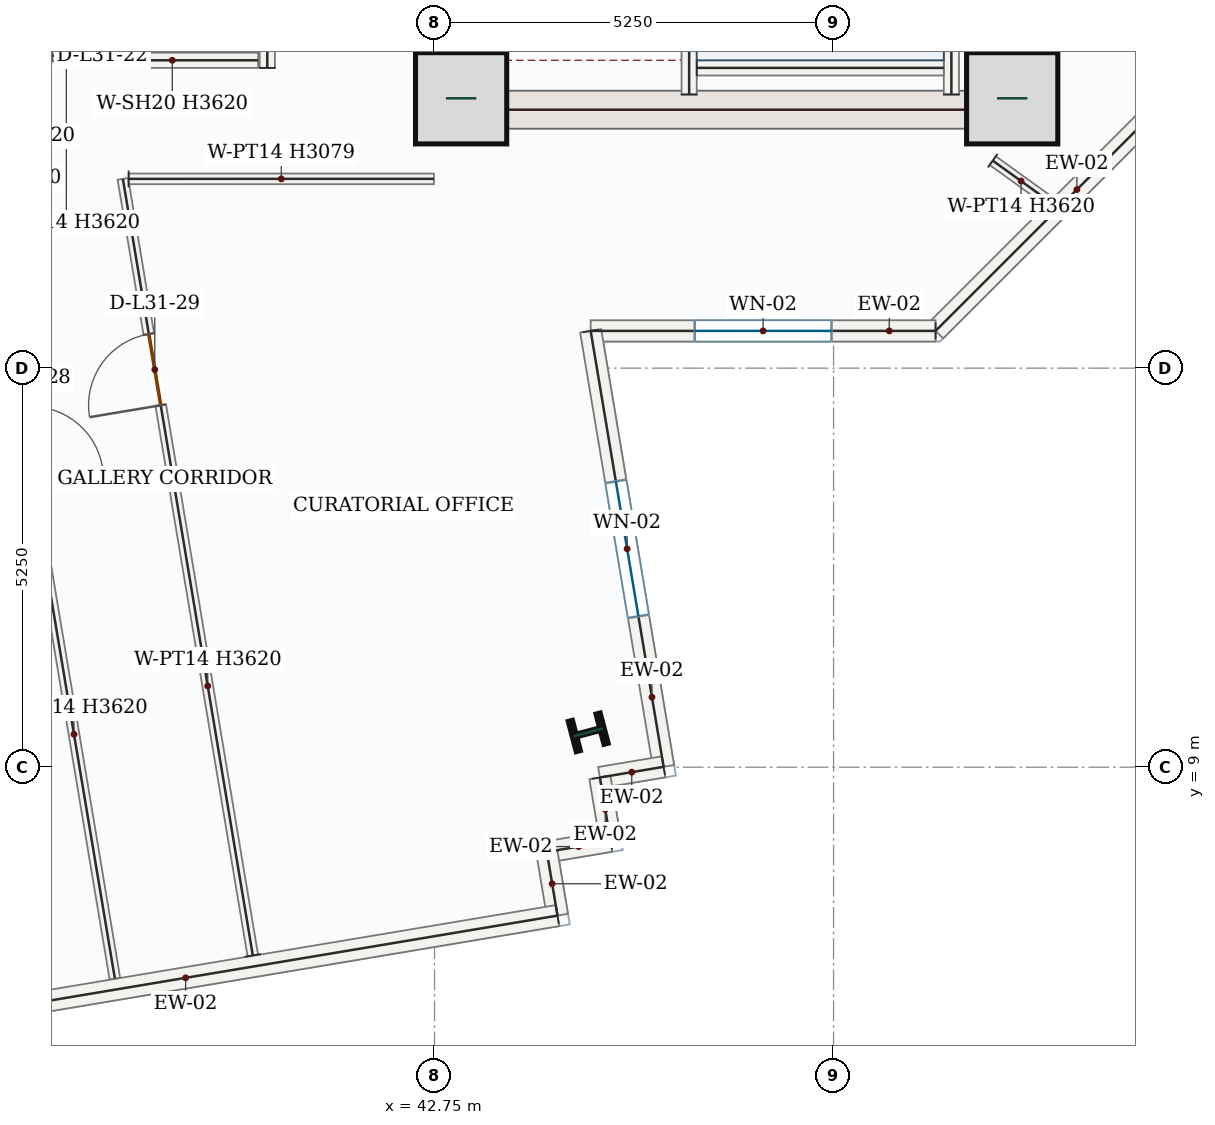
"""IFC4 building model, lengths in metres.
Left out: names, types, materials, properties, quantities, classifications, styles, units other than length and angle.
Written with IfcOpenShell. Run it as: python <this file> out.ifc"""

import sys

from ifc_helpers import new_model, si_unit, direction, frame, frame_2d, origin, origin_2d, place, context, subcontext, project, spatial, rectangle, i_section, extrude, source, transform, mapped, element, fill, save


model = new_model("IFC4")
c1 = context("Model", 3, precision=1e-05, world=origin(), true_north=direction((0.0, 1.0)))
c2 = subcontext(c1, "Body", "Model", "MODEL_VIEW")
j1 = project(units=[si_unit("LENGTHUNIT", "METRE"), si_unit("PLANEANGLEUNIT", "RADIAN")], contexts=[c1])
p1 = place(None, origin())
s1 = spatial("IfcSite", under=j1, at=p1, CompositionType="ELEMENT")
p2 = place(p1, origin())
s2 = spatial("IfcBuilding", under=s1, at=p2, CompositionType="ELEMENT")
p3 = place(p2, frame((0.0, 0.0, 139.5)))
s3 = spatial("IfcBuildingStorey", under=s2, at=p3, CompositionType="ELEMENT", Elevation=139.5)
p4 = place(p3, frame((43.0, 17.4, 0.0), z_axis=(0.0, 0.0, 1.0), x_axis=(0.0, 1.0, 0.0)))
e1 = element("IfcWall", 1, at=p4, inside=s3, PredefinedType="SHEAR", context=c2, shape_type="SweptSolid", body=[
    extrude(rectangle(XDim=8.55, YDim=0.5, at=frame_2d((4.275, 0.0))), origin(), (0.0, 0.0, 1.0), 3.62),
])
p5 = place(p4, frame((6.65, 0.0, 0.0)))
e2 = element("IfcOpeningElement", 2, at=p5, cuts=e1, PredefinedType="OPENING", context=c2, shape_type="SweptSolid", body=[
    extrude(rectangle(XDim=1.1, YDim=2.2, at=frame_2d((0.55, 1.1))), frame((0.0, 0.26, 0.0), z_axis=(0.0, -1.0, 0.0), x_axis=(1.0, 0.0, 0.0)), (0.0, 0.0, 1.0), 0.52),
])
p6 = place(p4, frame((1.75, 0.0, 0.0)))
e3 = element("IfcOpeningElement", 3, at=p6, cuts=e1, PredefinedType="OPENING", context=c2, shape_type="SweptSolid", body=[
    extrude(rectangle(XDim=1.3, YDim=2.2, at=frame_2d((0.65, 1.1))), frame((0.0, 0.26, 0.0), z_axis=(0.0, -1.0, 0.0), x_axis=(1.0, 0.0, 0.0)), (0.0, 0.0, 1.0), 0.52),
])
p7 = place(p4, frame((4.3, 0.0, 0.0)))
e4 = element("IfcOpeningElement", 4, at=p7, cuts=e1, PredefinedType="OPENING", context=c2, shape_type="SweptSolid", body=[
    extrude(rectangle(XDim=0.88, YDim=2.1, at=frame_2d((0.44, 1.05))), frame((0.0, 0.26, 0.0), z_axis=(0.0, -1.0, 0.0), x_axis=(1.0, 0.0, 0.0)), (0.0, 0.0, 1.0), 0.52),
])
m1 = source(origin(), c2, "Body", "SweptSolid", [
    extrude(rectangle(XDim=8.55, YDim=0.5, at=frame_2d((4.275, 0.0))), origin(), (0.0, 0.0, 1.0), 3.62),
])
p8 = place(p3, frame((50.5, 17.4, 0.0), z_axis=(0.0, 0.0, 1.0), x_axis=(0.0, 1.0, 0.0)))
e5 = element("IfcWall", 5, at=p8, inside=s3, PredefinedType="SHEAR", context=c2, shape_type="MappedRepresentation", body=[
    mapped(m1, transform((0.0, 0.0, 0.0), x_axis=(1.0, 0.0, 0.0), y_axis=(0.0, 1.0, 0.0), z_axis=(0.0, 0.0, 1.0), scale=1.0)),
])
m2 = source(origin(), c2, "Body", "SweptSolid", [
    extrude(rectangle(XDim=7.0, YDim=0.5, at=frame_2d((3.5, 0.0))), origin(), (0.0, 0.0, 1.0), 3.62),
])
p9 = place(p3, frame((43.25, 17.65, 0.0), z_axis=(0.0, 0.0, 1.0), x_axis=(1.0, 0.0, 0.0)))
e6 = element("IfcWall", 6, at=p9, inside=s3, PredefinedType="SHEAR", context=c2, shape_type="MappedRepresentation", body=[
    mapped(m2, transform((0.0, 0.0, 0.0), x_axis=(1.0, 0.0, 0.0), y_axis=(0.0, 1.0, 0.0), z_axis=(0.0, 0.0, 1.0), scale=1.0)),
])
m3 = source(origin(), c2, "Body", "SweptSolid", [
    extrude(rectangle(XDim=1.2, YDim=1.2, at=origin_2d()), origin(), (0.0, 0.0, 1.0), 3.9),
])
for number, where, z_axis, x_axis in (
    (7, (43.1, 17.8, 0.0), (0.0, 0.0, 1.0), (1.0, 0.0, 0.0)),
    (8, (50.35, 17.8, 0.0), (0.0, 0.0, 1.0), (1.0, 0.0, 0.0)),
):
    element("IfcColumn", number, at=place(p3, frame(where, z_axis=z_axis, x_axis=x_axis)), inside=s3, PredefinedType="COLUMN", context=c2, shape_type="MappedRepresentation", body=[
        mapped(m3, transform((0.0, 0.0, 0.0), x_axis=(1.0, 0.0, 0.0), y_axis=(0.0, 1.0, 0.0), z_axis=(0.0, 0.0, 1.0), scale=1.0)),
    ])
m4 = source(origin(), c2, "Body", "SweptSolid", [
    extrude(i_section(OverallWidth=0.412, OverallDepth=0.435, WebThickness=0.036, FlangeThickness=0.057, FilletRadius=0.018, at=origin_2d()), origin(), (0.0, 0.0, 1.0), 3.9),
])
p10 = place(p3, frame((44.772, 9.459, 0.0), z_axis=(0.0, 0.0, 1.0), x_axis=(-0.255445757936, 0.966823388604, 0.0)))
e9 = element("IfcColumn", 9, at=p10, inside=s3, PredefinedType="COLUMN", context=c2, shape_type="MappedRepresentation", body=[
    mapped(m4, transform((0.0, 0.0, 0.0), x_axis=(1.0, 0.0, 0.0), y_axis=(0.0, 1.0, 0.0), z_axis=(0.0, 0.0, 1.0), scale=1.0)),
])
m5 = source(origin(), c2, "Body", "SweptSolid", [
    extrude(rectangle(XDim=5.258, YDim=0.28, at=frame_2d((2.629, 0.0))), origin(), (0.0, 0.0, 1.0), 3.62),
])
p11 = place(p3, frame((53.06, 18.458, 0.0), z_axis=(0.0, 0.0, 1.0), x_axis=(-0.707106781187, -0.707106781187, 0.0)))
e10 = element("IfcWall", 10, at=p11, inside=s3, PredefinedType="SOLIDWALL", context=c2, shape_type="MappedRepresentation", body=[
    mapped(m5, transform((0.0, 0.0, 0.0), x_axis=(1.0, 0.0, 0.0), y_axis=(0.0, 1.0, 0.0), z_axis=(0.0, 0.0, 1.0), scale=1.0)),
])
p12 = place(p3, frame((49.342, 14.74, 0.0), z_axis=(0.0, 0.0, 1.0), x_axis=(-1.0, 0.0, 0.0)))
e11 = element("IfcWall", 11, at=p12, inside=s3, PredefinedType="SOLIDWALL", context=c2, shape_type="SweptSolid", body=[
    extrude(rectangle(XDim=4.538, YDim=0.28, at=frame_2d((2.269, 0.0))), origin(), (0.0, 0.0, 1.0), 3.62),
])
p13 = place(p12, frame((1.369, 0.0, 0.85)))
e12 = element("IfcOpeningElement", 12, at=p13, cuts=e11, PredefinedType="OPENING", context=c2, shape_type="SweptSolid", body=[
    extrude(rectangle(XDim=1.8, YDim=1.75, at=frame_2d((0.9, 0.875))), frame((0.0, 0.15, 0.0), z_axis=(0.0, -1.0, 0.0), x_axis=(1.0, 0.0, 0.0)), (0.0, 0.0, 1.0), 0.3),
])
p14 = place(p3, frame((44.804, 14.74, 0.0), z_axis=(0.0, 0.0, 1.0), x_axis=(0.165045758581, -0.986285910664, 0.0)))
e13 = element("IfcWall", 13, at=p14, inside=s3, PredefinedType="SOLIDWALL", context=c2, shape_type="SweptSolid", body=[
    extrude(rectangle(XDim=5.815, YDim=0.28, at=frame_2d((2.907, 0.0))), origin(), (0.0, 0.0, 1.0), 3.62),
])
p15 = place(p14, frame((2.007, 0.0, 0.85)))
e14 = element("IfcOpeningElement", 14, at=p15, cuts=e13, PredefinedType="OPENING", context=c2, shape_type="SweptSolid", body=[
    extrude(rectangle(XDim=1.8, YDim=1.75, at=frame_2d((0.9, 0.875))), frame((0.0, 0.15, 0.0), z_axis=(0.0, -1.0, 0.0), x_axis=(1.0, 0.0, 0.0)), (0.0, 0.0, 1.0), 0.3),
])
m6 = source(origin(), c2, "Body", "SweptSolid", [
    extrude(rectangle(XDim=0.85, YDim=0.28, at=frame_2d((0.425, 0.0))), origin(), (0.0, 0.0, 1.0), 3.62),
])
for number, where, z_axis, x_axis in (
    (15, (45.764, 9.005, 0.0), (0.0, 0.0, 1.0), (-0.986, -0.165, 0.0)),
    (16, (44.926, 8.865, 0.0), (0.0, 0.0, 1.0), (0.165, -0.986, 0.0)),
    (17, (45.066, 8.026, 0.0), (0.0, 0.0, 1.0), (-0.986, -0.165, 0.0)),
):
    element("IfcWall", number, at=place(p3, frame(where, z_axis=z_axis, x_axis=x_axis)), inside=s3, PredefinedType="SOLIDWALL", context=c2, shape_type="MappedRepresentation", body=[
        mapped(m6, transform((0.0, 0.0, 0.0), x_axis=(1.0, 0.0, 0.0), y_axis=(0.0, 1.0, 0.0), z_axis=(0.0, 0.0, 1.0), scale=1.0)),
    ])
m7 = source(origin(), c2, "Body", "SweptSolid", [
    extrude(rectangle(XDim=0.85, YDim=0.28, at=frame_2d((0.425, 0.0))), origin(), (0.0, 0.0, 1.0), 3.62),
])
p16 = place(p3, frame((44.228, 7.886, 0.0), z_axis=(0.0, 0.0, 1.0), x_axis=(0.165190918979, -0.986261608442, 0.0)))
e18 = element("IfcWall", 18, at=p16, inside=s3, PredefinedType="SOLIDWALL", context=c2, shape_type="MappedRepresentation", body=[
    mapped(m7, transform((0.0, 0.0, 0.0), x_axis=(1.0, 0.0, 0.0), y_axis=(0.0, 1.0, 0.0), z_axis=(0.0, 0.0, 1.0), scale=1.0)),
])
m8 = source(origin(), c2, "Body", "SweptSolid", [
    extrude(rectangle(XDim=9.92, YDim=0.28, at=frame_2d((4.96, 0.0))), origin(), (0.0, 0.0, 1.0), 3.62),
])
p17 = place(p3, frame((44.368, 7.048, 0.0), z_axis=(0.0, 0.0, 1.0), x_axis=(-0.986282616944, -0.165065440096, 0.0)))
e19 = element("IfcWall", 19, at=p17, inside=s3, PredefinedType="SOLIDWALL", context=c2, shape_type="MappedRepresentation", body=[
    mapped(m8, transform((0.0, 0.0, 0.0), x_axis=(1.0, 0.0, 0.0), y_axis=(0.0, 1.0, 0.0), z_axis=(0.0, 0.0, 1.0), scale=1.0)),
])
m9 = source(origin(), c2, "Body", "SweptSolid", [
    extrude(rectangle(XDim=7.87, YDim=0.2, at=frame_2d((3.935, 0.0))), origin(), (0.0, 0.0, 1.0), 3.62),
])
p18 = place(p3, frame((49.55, 17.85, 0.0), z_axis=(0.0, 0.0, 1.0), x_axis=(0.0, 1.0, 0.0)))
e20 = element("IfcWall", 20, at=p18, inside=s3, PredefinedType="SOLIDWALL", context=c2, shape_type="MappedRepresentation", body=[
    mapped(m9, transform((0.0, 0.0, 0.0), x_axis=(1.0, 0.0, 0.0), y_axis=(0.0, 1.0, 0.0), z_axis=(0.0, 0.0, 1.0), scale=1.0)),
])
p19 = place(p3, frame((46.1, 17.85, 0.0), z_axis=(0.0, 0.0, 1.0), x_axis=(0.0, 1.0, 0.0)))
e21 = element("IfcWall", 21, at=p19, inside=s3, PredefinedType="SOLIDWALL", context=c2, shape_type="SweptSolid", body=[
    extrude(rectangle(XDim=8.0, YDim=0.2, at=frame_2d((4.0, 0.0))), origin(), (0.0, 0.0, 1.0), 3.62),
])
p20 = place(p19, frame((6.3, 0.0, 0.0)))
e22 = element("IfcOpeningElement", 22, at=p20, cuts=e21, PredefinedType="OPENING", context=c2, shape_type="SweptSolid", body=[
    extrude(rectangle(XDim=1.05, YDim=2.15, at=frame_2d((0.525, 1.075))), frame((0.0, 0.11, 0.0), z_axis=(0.0, -1.0, 0.0), x_axis=(1.0, 0.0, 0.0)), (0.0, 0.0, 1.0), 0.22),
])
m10 = source(origin(), c2, "Body", "SweptSolid", [
    extrude(rectangle(XDim=3.25, YDim=0.2, at=frame_2d((1.625, 0.0))), origin(), (0.0, 0.0, 1.0), 3.62),
])
p21 = place(p3, frame((46.2, 18.2, 0.0), z_axis=(0.0, 0.0, 1.0), x_axis=(1.0, 0.0, 0.0)))
e23 = element("IfcWall", 23, at=p21, inside=s3, PredefinedType="SOLIDWALL", context=c2, shape_type="MappedRepresentation", body=[
    mapped(m10, transform((0.0, 0.0, 0.0), x_axis=(1.0, 0.0, 0.0), y_axis=(0.0, 1.0, 0.0), z_axis=(0.0, 0.0, 1.0), scale=1.0)),
])
m11 = source(origin(), c2, "Body", "SweptSolid", [
    extrude(rectangle(XDim=2.35, YDim=0.2, at=frame_2d((1.175, 0.0))), origin(), (0.0, 0.0, 1.0), 3.62),
])
p22 = place(p3, frame((38.05, 18.2, 0.0), z_axis=(0.0, 0.0, 1.0), x_axis=(0.0, 1.0, 0.0)))
e24 = element("IfcWall", 24, at=p22, inside=s3, PredefinedType="SOLIDWALL", context=c2, shape_type="MappedRepresentation", body=[
    mapped(m11, transform((0.0, 0.0, 0.0), x_axis=(1.0, 0.0, 0.0), y_axis=(0.0, 1.0, 0.0), z_axis=(0.0, 0.0, 1.0), scale=1.0)),
])
p23 = place(p3, frame((40.55, 18.2, 0.0), z_axis=(0.0, 0.0, 1.0), x_axis=(0.0, 1.0, 0.0)))
e25 = element("IfcWall", 25, at=p23, inside=s3, PredefinedType="SOLIDWALL", context=c2, shape_type="SweptSolid", body=[
    extrude(rectangle(XDim=2.35, YDim=0.2, at=frame_2d((1.175, 0.0))), origin(), (0.0, 0.0, 1.0), 3.62),
])
p24 = place(p23, frame((0.625, 0.0, 0.0)))
e26 = element("IfcOpeningElement", 26, at=p24, cuts=e25, PredefinedType="OPENING", context=c2, shape_type="SweptSolid", body=[
    extrude(rectangle(XDim=1.1, YDim=2.15, at=frame_2d((0.55, 1.075))), frame((0.0, 0.11, 0.0), z_axis=(0.0, -1.0, 0.0), x_axis=(1.0, 0.0, 0.0)), (0.0, 0.0, 1.0), 0.22),
])
m12 = source(origin(), c2, "Body", "SweptSolid", [
    extrude(rectangle(XDim=2.26, YDim=0.2, at=frame_2d((1.13, 0.0))), origin(), (0.0, 0.0, 1.0), 3.62),
])
p25 = place(p3, frame((38.17, 18.3, 0.0), z_axis=(0.0, 0.0, 1.0), x_axis=(1.0, 0.0, 0.0)))
e27 = element("IfcWall", 27, at=p25, inside=s3, PredefinedType="SOLIDWALL", context=c2, shape_type="MappedRepresentation", body=[
    mapped(m12, transform((0.0, 0.0, 0.0), x_axis=(1.0, 0.0, 0.0), y_axis=(0.0, 1.0, 0.0), z_axis=(0.0, 0.0, 1.0), scale=1.0)),
])
p26 = place(p3, frame((37.945, 18.36, 0.0), z_axis=(0.0, 0.0, 1.0), x_axis=(-1.0, 0.0, 0.0)))
e28 = element("IfcWall", 28, at=p26, inside=s3, PredefinedType="PARTITIONING", context=c2, shape_type="SweptSolid", body=[
    extrude(rectangle(XDim=1.23, YDim=0.14, at=frame_2d((0.615, 0.0))), origin(), (0.0, 0.0, 1.0), 3.62),
])
p27 = place(p26, frame((0.228, 0.0, 0.0)))
e29 = element("IfcOpeningElement", 29, at=p27, cuts=e28, PredefinedType="OPENING", context=c2, shape_type="SweptSolid", body=[
    extrude(rectangle(XDim=0.88, YDim=2.1, at=frame_2d((0.44, 1.05))), frame((0.0, 0.08, 0.0), z_axis=(0.0, -1.0, 0.0), x_axis=(1.0, 0.0, 0.0)), (0.0, 0.0, 1.0), 0.16),
])
p28 = place(p3, frame((36.978, 15.585, 0.0), z_axis=(0.0, 0.0, 1.0), x_axis=(0.165024399413, -0.986289484684, 0.0)))
e30 = element("IfcWall", 30, at=p28, inside=s3, PredefinedType="PARTITIONING", context=c2, shape_type="SweptSolid", body=[
    extrude(rectangle(XDim=9.495, YDim=0.14, at=frame_2d((4.748, 0.0))), origin(), (0.0, 0.0, 1.0), 3.62),
])
p29 = place(p28, frame((1.88, 0.0, 0.0)))
e31 = element("IfcOpeningElement", 31, at=p29, cuts=e30, PredefinedType="OPENING", context=c2, shape_type="SweptSolid", body=[
    extrude(rectangle(XDim=0.95, YDim=2.15, at=frame_2d((0.475, 1.075))), frame((0.0, 0.08, 0.0), z_axis=(0.0, -1.0, 0.0), x_axis=(1.0, 0.0, 0.0)), (0.0, 0.0, 1.0), 0.16),
])
p30 = place(p3, frame((40.359, 6.524, 0.0), z_axis=(0.0, 0.0, 1.0), x_axis=(-0.165056345303, 0.986284139016, 0.0)))
e32 = element("IfcWall", 32, at=p30, inside=s3, PredefinedType="PARTITIONING", context=c2, shape_type="SweptSolid", body=[
    extrude(rectangle(XDim=10.358, YDim=0.14, at=frame_2d((5.179, 0.0))), origin(), (0.0, 0.0, 1.0), 3.62),
])
p31 = place(p30, frame((7.338, 0.0, 0.0)))
e33 = element("IfcOpeningElement", 33, at=p31, cuts=e32, PredefinedType="OPENING", context=c2, shape_type="SweptSolid", body=[
    extrude(rectangle(XDim=0.95, YDim=2.15, at=frame_2d((0.475, 1.075))), frame((0.0, 0.08, 0.0), z_axis=(0.0, -1.0, 0.0), x_axis=(1.0, 0.0, 0.0)), (0.0, 0.0, 1.0), 0.16),
])
m13 = source(origin(), c2, "Body", "SweptSolid", [
    extrude(rectangle(XDim=4.017, YDim=0.14, at=frame_2d((2.008, 0.0))), origin(), (0.0, 0.0, 1.0), 3.079),
])
p32 = place(p3, frame((38.726, 16.74, 0.0), z_axis=(0.0, 0.0, 1.0), x_axis=(0.999999998153, 6.0779189e-05, 0.0)))
e34 = element("IfcWall", 34, at=p32, inside=s3, PredefinedType="PARTITIONING", context=c2, shape_type="MappedRepresentation", body=[
    mapped(m13, transform((0.0, 0.0, 0.0), x_axis=(1.0, 0.0, 0.0), y_axis=(0.0, 1.0, 0.0), z_axis=(0.0, 0.0, 1.0), scale=1.0)),
])
m14 = source(origin(), c2, "Body", "SweptSolid", [
    extrude(rectangle(XDim=0.919, YDim=0.14, at=frame_2d((0.459, 0.0))), origin(), (0.0, 0.0, 1.0), 3.62),
])
p33 = place(p3, frame((50.094, 16.98, 0.0), z_axis=(0.0, 0.0, 1.0), x_axis=(0.81148395648, -0.584374698611, 0.0)))
e35 = element("IfcWall", 35, at=p33, inside=s3, PredefinedType="PARTITIONING", context=c2, shape_type="MappedRepresentation", body=[
    mapped(m14, transform((0.0, 0.0, 0.0), x_axis=(1.0, 0.0, 0.0), y_axis=(0.0, 1.0, 0.0), z_axis=(0.0, 0.0, 1.0), scale=1.0)),
])
m15 = source(origin(), c2, "Body", "SweptSolid", [
    extrude(rectangle(XDim=1.8, YDim=1.75, at=frame_2d((0.9, 0.875))), frame((0.0, 0.03, 0.0), z_axis=(0.0, -1.0, 0.0), x_axis=(1.0, 0.0, 0.0)), (0.0, 0.0, 1.0), 0.06),
])
p34 = place(p13, origin())
e36 = element("IfcWindow", 36, at=p34, inside=s3, PartitioningType="DOUBLE_PANEL_VERTICAL", PredefinedType="WINDOW", context=c2, shape_type="MappedRepresentation", body=[
    mapped(m15, transform((0.0, 0.0, 0.0), x_axis=(1.0, 0.0, 0.0), y_axis=(0.0, 1.0, 0.0), z_axis=(0.0, 0.0, 1.0), scale=1.0)),
])
fill(e12, e36)
p35 = place(p15, origin())
e37 = element("IfcWindow", 37, at=p35, inside=s3, PartitioningType="DOUBLE_PANEL_VERTICAL", PredefinedType="WINDOW", context=c2, shape_type="MappedRepresentation", body=[
    mapped(m15, transform((0.0, 0.0, 0.0), x_axis=(1.0, 0.0, 0.0), y_axis=(0.0, 1.0, 0.0), z_axis=(0.0, 0.0, 1.0), scale=1.0)),
])
fill(e14, e37)
m16 = source(origin(), c2, "Body", "SweptSolid", [
    extrude(rectangle(XDim=0.95, YDim=2.15, at=frame_2d((0.475, 1.075))), frame((0.0, 0.025, 0.0), z_axis=(0.0, -1.0, 0.0), x_axis=(1.0, 0.0, 0.0)), (0.0, 0.0, 1.0), 0.05),
])
p36 = place(p31, origin())
e38 = element("IfcDoor", 38, at=p36, inside=s3, OperationType="SINGLE_SWING_LEFT", PredefinedType="DOOR", context=c2, shape_type="MappedRepresentation", body=[
    mapped(m16, transform((0.0, 0.0, 0.0), x_axis=(1.0, 0.0, 0.0), y_axis=(0.0, 1.0, 0.0), z_axis=(0.0, 0.0, 1.0), scale=1.0)),
])
fill(e33, e38)
save(model, sys.argv[1])
